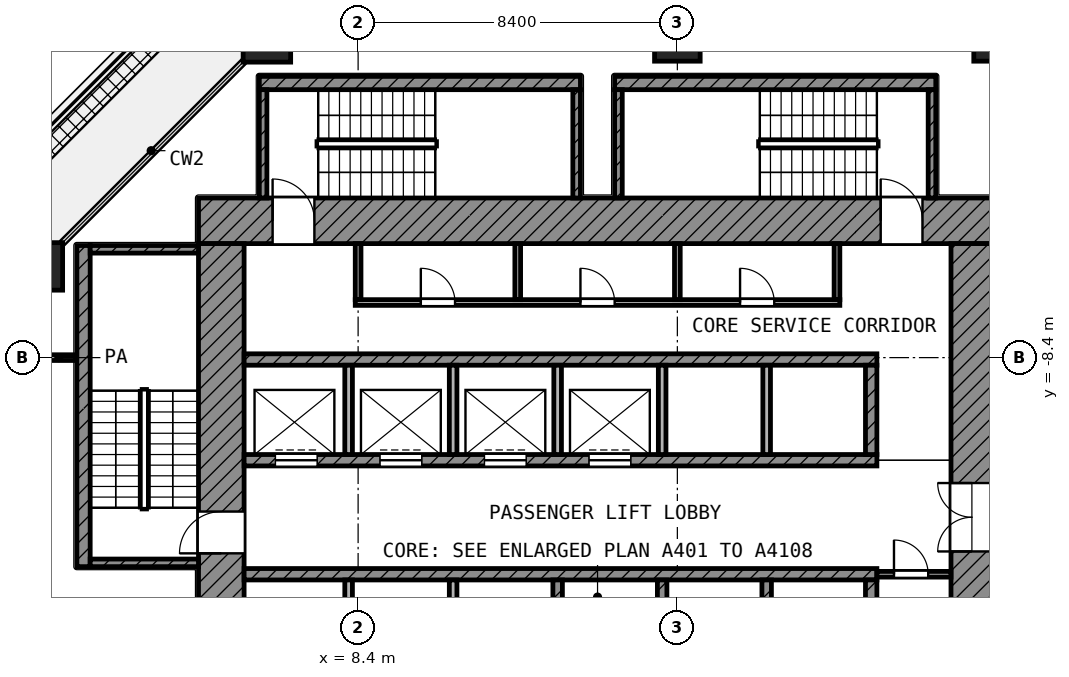
"""IFC4 building model, lengths in metres.
Left out: names, types, materials, properties, quantities, classifications, styles, units other than length and angle.
Written with IfcOpenShell. Run it as: python <this file> out.ifc"""

import sys

from ifc_helpers import new_model, si_unit, direction, frame, frame_2d, origin, origin_2d, place, context, subcontext, project, spatial, rectangle, extrude, element, fill, save


model = new_model("IFC4")
c1 = context("Model", 3, precision=1e-05, world=origin(), true_north=direction((0.0, 1.0)))
c2 = subcontext(c1, "Body", "Model", "MODEL_VIEW")
j1 = project(units=[si_unit("LENGTHUNIT", "METRE"), si_unit("PLANEANGLEUNIT", "RADIAN")], contexts=[c1])
p1 = place(None, origin())
s1 = spatial("IfcSite", under=j1, at=p1, CompositionType="ELEMENT")
p2 = place(p1, origin())
s2 = spatial("IfcBuilding", under=s1, at=p2, CompositionType="ELEMENT")
p3 = place(p2, frame((0.0, 0.0, 60.2)))
s3 = spatial("IfcBuildingStorey", under=s2, at=p3, CompositionType="ELEMENT", Elevation=60.2)
p4 = place(p3, frame((6.0, 0.0, 0.0), z_axis=(0.0, 0.0, 1.0), x_axis=(1.0, 0.0, 0.0)))
e1 = element("IfcColumn", 1, at=p4, inside=s3, PredefinedType="COLUMN", context=c2, shape_type="SweptSolid", body=[
    extrude(rectangle(XDim=1.25, YDim=1.25, at=origin_2d()), origin(), (0.0, 0.0, 1.0), 4.2),
])
for number, where, z_axis, x_axis in (
    (2, (16.8, 0.0, 0.0), (0.0, 0.0, 1.0), (1.0, 0.0, 0.0)),
    (3, (25.2, 0.0, 0.0), (0.0, 0.0, 1.0), (1.0, 0.0, 0.0)),
):
    element("IfcColumn", number, at=place(p3, frame(where, z_axis=z_axis, x_axis=x_axis)), inside=s3, PredefinedType="COLUMN", context=c2, shape_type="SweptSolid", body=[
        extrude(rectangle(XDim=1.2, YDim=1.2, at=origin_2d()), origin(), (0.0, 0.0, 1.0), 4.2),
    ])
p5 = place(p3, frame((0.0, -6.0, 0.0), z_axis=(0.0, 0.0, 1.0), x_axis=(1.0, 0.0, 0.0)))
e4 = element("IfcColumn", 4, at=p5, inside=s3, PredefinedType="COLUMN", context=c2, shape_type="SweptSolid", body=[
    extrude(rectangle(XDim=1.25, YDim=1.25, at=origin_2d()), origin(), (0.0, 0.0, 1.0), 4.2),
])
p6 = place(p3, frame((4.2, -4.8, 0.0), z_axis=(0.0, 0.0, 1.0), x_axis=(1.0, 0.0, 0.0)))
e5 = element("IfcWall", 5, at=p6, inside=s3, PredefinedType="SHEAR", context=c2, shape_type="SweptSolid", body=[
    extrude(rectangle(XDim=20.9, YDim=1.2, at=frame_2d((10.45, 0.0))), origin(), (0.0, 0.0, 1.0), 3.9),
])
p7 = place(p6, frame((1.95, 0.0, 0.0)))
e6 = element("IfcOpeningElement", 6, at=p7, cuts=e5, PredefinedType="OPENING", context=c2, shape_type="SweptSolid", body=[
    extrude(rectangle(XDim=1.1, YDim=2.1, at=frame_2d((0.55, 1.05))), frame((0.0, 0.61, 0.0), z_axis=(0.0, -1.0, 0.0), x_axis=(1.0, 0.0, 0.0)), (0.0, 0.0, 1.0), 1.22),
])
p8 = place(p6, frame((17.95, 0.0, 0.0)))
e7 = element("IfcOpeningElement", 7, at=p8, cuts=e5, PredefinedType="OPENING", context=c2, shape_type="SweptSolid", body=[
    extrude(rectangle(XDim=1.1, YDim=2.1, at=frame_2d((0.55, 1.05))), frame((0.0, 0.61, 0.0), z_axis=(0.0, -1.0, 0.0), x_axis=(1.0, 0.0, 0.0)), (0.0, 0.0, 1.0), 1.22),
])
p9 = place(p3, frame((4.8, -25.1, 0.0), z_axis=(0.0, 0.0, 1.0), x_axis=(0.0, 1.0, 0.0)))
e8 = element("IfcWall", 8, at=p9, inside=s3, PredefinedType="SHEAR", context=c2, shape_type="SweptSolid", body=[
    extrude(rectangle(XDim=19.7, YDim=1.2, at=frame_2d((9.85, 0.0))), origin(), (0.0, 0.0, 1.0), 3.9),
])
p10 = place(p9, frame((11.55, 0.0, 0.0)))
e9 = element("IfcOpeningElement", 9, at=p10, cuts=e8, PredefinedType="OPENING", context=c2, shape_type="SweptSolid", body=[
    extrude(rectangle(XDim=1.1, YDim=2.1, at=frame_2d((0.55, 1.05))), frame((0.0, 0.61, 0.0), z_axis=(0.0, -1.0, 0.0), x_axis=(1.0, 0.0, 0.0)), (0.0, 0.0, 1.0), 1.22),
])
p11 = place(p9, frame((2.25, 0.0, 0.0)))
e10 = element("IfcOpeningElement", 10, at=p11, cuts=e8, PredefinedType="OPENING", context=c2, shape_type="SweptSolid", body=[
    extrude(rectangle(XDim=1.1, YDim=2.1, at=frame_2d((0.55, 1.05))), frame((0.0, 0.61, 0.0), z_axis=(0.0, -1.0, 0.0), x_axis=(1.0, 0.0, 0.0)), (0.0, 0.0, 1.0), 1.22),
])
p12 = place(p3, frame((24.55, -24.0, 0.0), z_axis=(0.0, 0.0, 1.0), x_axis=(0.0, 1.0, 0.0)))
e11 = element("IfcWall", 11, at=p12, inside=s3, PredefinedType="SHEAR", context=c2, shape_type="SweptSolid", body=[
    extrude(rectangle(XDim=18.6, YDim=1.1, at=frame_2d((9.3, 0.0))), origin(), (0.0, 0.0, 1.0), 3.9),
])
p13 = place(p12, frame((10.5, 0.0, 0.0)))
e12 = element("IfcOpeningElement", 12, at=p13, cuts=e11, PredefinedType="OPENING", context=c2, shape_type="SweptSolid", body=[
    extrude(rectangle(XDim=1.8, YDim=2.1, at=frame_2d((0.9, 1.05))), frame((0.0, 0.56, 0.0), z_axis=(0.0, -1.0, 0.0), x_axis=(1.0, 0.0, 0.0)), (0.0, 0.0, 1.0), 1.12),
])
p14 = place(p3, frame((5.4, -8.45, 0.0), z_axis=(0.0, 0.0, 1.0), x_axis=(1.0, 0.0, 0.0)))
e13 = element("IfcWall", 13, at=p14, inside=s3, PredefinedType="SHEAR", context=c2, shape_type="SweptSolid", body=[
    extrude(rectangle(XDim=16.65, YDim=0.3, at=frame_2d((8.325, 0.0))), origin(), (0.0, 0.0, 1.0), 3.9),
])
p15 = place(p3, frame((5.4, -11.1, 0.0), z_axis=(0.0, 0.0, 1.0), x_axis=(1.0, 0.0, 0.0)))
e14 = element("IfcWall", 14, at=p15, inside=s3, PredefinedType="SHEAR", context=c2, shape_type="SweptSolid", body=[
    extrude(rectangle(XDim=16.65, YDim=0.3, at=frame_2d((8.325, 0.0))), origin(), (0.0, 0.0, 1.0), 3.9),
])
p16 = place(p15, frame((0.825, 0.0, 0.0)))
e15 = element("IfcOpeningElement", 15, at=p16, cuts=e14, PredefinedType="OPENING", context=c2, shape_type="SweptSolid", body=[
    extrude(rectangle(XDim=1.1, YDim=2.1, at=frame_2d((0.55, 1.05))), frame((0.0, 0.16, 0.0), z_axis=(0.0, -1.0, 0.0), x_axis=(1.0, 0.0, 0.0)), (0.0, 0.0, 1.0), 0.32),
])
p17 = place(p15, frame((3.575, 0.0, 0.0)))
e16 = element("IfcOpeningElement", 16, at=p17, cuts=e14, PredefinedType="OPENING", context=c2, shape_type="SweptSolid", body=[
    extrude(rectangle(XDim=1.1, YDim=2.1, at=frame_2d((0.55, 1.05))), frame((0.0, 0.16, 0.0), z_axis=(0.0, -1.0, 0.0), x_axis=(1.0, 0.0, 0.0)), (0.0, 0.0, 1.0), 0.32),
])
p18 = place(p15, frame((6.325, 0.0, 0.0)))
e17 = element("IfcOpeningElement", 17, at=p18, cuts=e14, PredefinedType="OPENING", context=c2, shape_type="SweptSolid", body=[
    extrude(rectangle(XDim=1.1, YDim=2.1, at=frame_2d((0.55, 1.05))), frame((0.0, 0.16, 0.0), z_axis=(0.0, -1.0, 0.0), x_axis=(1.0, 0.0, 0.0)), (0.0, 0.0, 1.0), 0.32),
])
p19 = place(p15, frame((9.075, 0.0, 0.0)))
e18 = element("IfcOpeningElement", 18, at=p19, cuts=e14, PredefinedType="OPENING", context=c2, shape_type="SweptSolid", body=[
    extrude(rectangle(XDim=1.1, YDim=2.1, at=frame_2d((0.55, 1.05))), frame((0.0, 0.16, 0.0), z_axis=(0.0, -1.0, 0.0), x_axis=(1.0, 0.0, 0.0)), (0.0, 0.0, 1.0), 0.32),
])
p20 = place(p3, frame((5.4, -14.1, 0.0), z_axis=(0.0, 0.0, 1.0), x_axis=(1.0, 0.0, 0.0)))
e19 = element("IfcWall", 19, at=p20, inside=s3, PredefinedType="SHEAR", context=c2, shape_type="SweptSolid", body=[
    extrude(rectangle(XDim=16.65, YDim=0.3, at=frame_2d((8.325, 0.0))), origin(), (0.0, 0.0, 1.0), 3.9),
])
p21 = place(p3, frame((21.9, -10.95, 0.0), z_axis=(0.0, 0.0, 1.0), x_axis=(0.0, 1.0, 0.0)))
e20 = element("IfcWall", 20, at=p21, inside=s3, PredefinedType="SHEAR", context=c2, shape_type="SweptSolid", body=[
    extrude(rectangle(XDim=2.35, YDim=0.3, at=frame_2d((1.175, 0.0))), origin(), (0.0, 0.0, 1.0), 3.9),
])
p22 = place(p3, frame((21.9, -16.6, 0.0), z_axis=(0.0, 0.0, 1.0), x_axis=(0.0, 1.0, 0.0)))
e21 = element("IfcWall", 21, at=p22, inside=s3, PredefinedType="SHEAR", context=c2, shape_type="SweptSolid", body=[
    extrude(rectangle(XDim=2.35, YDim=0.3, at=frame_2d((1.175, 0.0))), origin(), (0.0, 0.0, 1.0), 3.9),
])
for number, where, z_axis, x_axis in (
    (22, (8.15, -10.95, 0.0), (0.0, 0.0, 1.0), (0.0, 1.0, 0.0)),
    (23, (10.9, -10.95, 0.0), (0.0, 0.0, 1.0), (0.0, 1.0, 0.0)),
    (24, (13.65, -10.95, 0.0), (0.0, 0.0, 1.0), (0.0, 1.0, 0.0)),
    (25, (16.4, -10.95, 0.0), (0.0, 0.0, 1.0), (0.0, 1.0, 0.0)),
    (26, (19.15, -10.95, 0.0), (0.0, 0.0, 1.0), (0.0, 1.0, 0.0)),
):
    element("IfcWall", number, at=place(p3, frame(where, z_axis=z_axis, x_axis=x_axis)), inside=s3, PredefinedType="PARTITIONING", context=c2, shape_type="SweptSolid", body=[
        extrude(rectangle(XDim=2.35, YDim=0.2, at=frame_2d((1.175, 0.0))), origin(), (0.0, 0.0, 1.0), 3.9),
    ])
for number, where, z_axis, x_axis in (
    (27, (8.15, -16.6, 0.0), (0.0, 0.0, 1.0), (0.0, 1.0, 0.0)),
    (28, (10.9, -16.6, 0.0), (0.0, 0.0, 1.0), (0.0, 1.0, 0.0)),
):
    element("IfcWall", number, at=place(p3, frame(where, z_axis=z_axis, x_axis=x_axis)), inside=s3, PredefinedType="PARTITIONING", context=c2, shape_type="SweptSolid", body=[
        extrude(rectangle(XDim=2.35, YDim=0.2, at=frame_2d((1.175, 0.0))), origin(), (0.0, 0.0, 1.0), 3.9),
    ])
for number, where, z_axis, x_axis in (
    (29, (13.65, -16.6, 0.0), (0.0, 0.0, 1.0), (0.0, 1.0, 0.0)),
    (30, (16.4, -16.6, 0.0), (0.0, 0.0, 1.0), (0.0, 1.0, 0.0)),
    (31, (19.15, -16.6, 0.0), (0.0, 0.0, 1.0), (0.0, 1.0, 0.0)),
):
    element("IfcWall", number, at=place(p3, frame(where, z_axis=z_axis, x_axis=x_axis)), inside=s3, PredefinedType="SHEAR", context=c2, shape_type="SweptSolid", body=[
        extrude(rectangle(XDim=2.35, YDim=0.25, at=frame_2d((1.175, 0.0))), origin(), (0.0, 0.0, 1.0), 3.9),
    ])
p23 = place(p3, frame((22.05, -14.1, 0.0), z_axis=(0.0, 0.0, 1.0), x_axis=(1.0, 0.0, 0.0)))
e32 = element("IfcWall", 32, at=p23, inside=s3, PredefinedType="PARTITIONING", context=c2, shape_type="SweptSolid", body=[
    extrude(rectangle(XDim=1.95, YDim=0.15, at=frame_2d((0.975, 0.0))), origin(), (0.0, 0.0, 1.0), 3.9),
])
p24 = place(p23, frame((0.45, 0.0, 0.0)))
e33 = element("IfcOpeningElement", 33, at=p24, cuts=e32, PredefinedType="OPENING", context=c2, shape_type="SweptSolid", body=[
    extrude(rectangle(XDim=0.9, YDim=2.1, at=frame_2d((0.45, 1.05))), frame((0.0, 0.085, 0.0), z_axis=(0.0, -1.0, 0.0), x_axis=(1.0, 0.0, 0.0)), (0.0, 0.0, 1.0), 0.17),
])
p25 = place(p3, frame((8.325, -6.95, 0.0), z_axis=(0.0, 0.0, 1.0), x_axis=(1.0, 0.0, 0.0)))
e34 = element("IfcWall", 34, at=p25, inside=s3, PredefinedType="PARTITIONING", context=c2, shape_type="SweptSolid", body=[
    extrude(rectangle(XDim=12.75, YDim=0.15, at=frame_2d((6.375, 0.0))), origin(), (0.0, 0.0, 1.0), 3.9),
])
p26 = place(p25, frame((1.725, 0.0, 0.0)))
e35 = element("IfcOpeningElement", 35, at=p26, cuts=e34, PredefinedType="OPENING", context=c2, shape_type="SweptSolid", body=[
    extrude(rectangle(XDim=0.9, YDim=2.1, at=frame_2d((0.45, 1.05))), frame((0.0, 0.085, 0.0), z_axis=(0.0, -1.0, 0.0), x_axis=(1.0, 0.0, 0.0)), (0.0, 0.0, 1.0), 0.17),
])
p27 = place(p25, frame((5.925, 0.0, 0.0)))
e36 = element("IfcOpeningElement", 36, at=p27, cuts=e34, PredefinedType="OPENING", context=c2, shape_type="SweptSolid", body=[
    extrude(rectangle(XDim=0.9, YDim=2.1, at=frame_2d((0.45, 1.05))), frame((0.0, 0.085, 0.0), z_axis=(0.0, -1.0, 0.0), x_axis=(1.0, 0.0, 0.0)), (0.0, 0.0, 1.0), 0.17),
])
p28 = place(p25, frame((10.125, 0.0, 0.0)))
e37 = element("IfcOpeningElement", 37, at=p28, cuts=e34, PredefinedType="OPENING", context=c2, shape_type="SweptSolid", body=[
    extrude(rectangle(XDim=0.9, YDim=2.1, at=frame_2d((0.45, 1.05))), frame((0.0, 0.085, 0.0), z_axis=(0.0, -1.0, 0.0), x_axis=(1.0, 0.0, 0.0)), (0.0, 0.0, 1.0), 0.17),
])
for number, where, z_axis, x_axis in (
    (38, (8.4, -6.875, 0.0), (0.0, 0.0, 1.0), (0.0, 1.0, 0.0)),
    (39, (12.6, -6.875, 0.0), (0.0, 0.0, 1.0), (0.0, 1.0, 0.0)),
    (40, (16.8, -6.875, 0.0), (0.0, 0.0, 1.0), (0.0, 1.0, 0.0)),
    (41, (21.0, -6.875, 0.0), (0.0, 0.0, 1.0), (0.0, 1.0, 0.0)),
):
    element("IfcWall", number, at=place(p3, frame(where, z_axis=z_axis, x_axis=x_axis)), inside=s3, PredefinedType="PARTITIONING", context=c2, shape_type="SweptSolid", body=[
        extrude(rectangle(XDim=1.475, YDim=0.15, at=frame_2d((0.738, 0.0))), origin(), (0.0, 0.0, 1.0), 3.9),
    ])
p29 = place(p3, frame((1.175, -13.9, 0.0), z_axis=(0.0, 0.0, 1.0), x_axis=(0.0, 1.0, 0.0)))
e42 = element("IfcWall", 42, at=p29, inside=s3, PredefinedType="SHEAR", context=c2, shape_type="SweptSolid", body=[
    extrude(rectangle(XDim=8.45, YDim=0.35, at=frame_2d((4.225, 0.0))), origin(), (0.0, 0.0, 1.0), 3.9),
])
for number, where, z_axis, x_axis in (
    (43, (1.35, -5.55, 0.0), (0.0, 0.0, 1.0), (1.0, 0.0, 0.0)),
    (44, (1.35, -13.8, 0.0), (0.0, 0.0, 1.0), (1.0, 0.0, 0.0)),
):
    element("IfcWall", number, at=place(p3, frame(where, z_axis=z_axis, x_axis=x_axis)), inside=s3, PredefinedType="SHEAR", context=c2, shape_type="SweptSolid", body=[
        extrude(rectangle(XDim=2.85, YDim=0.2, at=frame_2d((1.425, 0.0))), origin(), (0.0, 0.0, 1.0), 3.9),
    ])
p30 = place(p3, frame((5.8, -1.175, 0.0), z_axis=(0.0, 0.0, 1.0), x_axis=(1.0, 0.0, 0.0)))
e45 = element("IfcWall", 45, at=p30, inside=s3, PredefinedType="SHEAR", context=c2, shape_type="SweptSolid", body=[
    extrude(rectangle(XDim=8.45, YDim=0.35, at=frame_2d((4.225, 0.0))), origin(), (0.0, 0.0, 1.0), 3.9),
])
for number, where, z_axis, x_axis in (
    (46, (5.9, -4.2, 0.0), (0.0, 0.0, 1.0), (0.0, 1.0, 0.0)),
    (47, (14.15, -4.2, 0.0), (0.0, 0.0, 1.0), (0.0, 1.0, 0.0)),
):
    element("IfcWall", number, at=place(p3, frame(where, z_axis=z_axis, x_axis=x_axis)), inside=s3, PredefinedType="SHEAR", context=c2, shape_type="SweptSolid", body=[
        extrude(rectangle(XDim=2.85, YDim=0.2, at=frame_2d((1.425, 0.0))), origin(), (0.0, 0.0, 1.0), 3.9),
    ])
p31 = place(p3, frame((15.15, -1.175, 0.0), z_axis=(0.0, 0.0, 1.0), x_axis=(1.0, 0.0, 0.0)))
e48 = element("IfcWall", 48, at=p31, inside=s3, PredefinedType="SHEAR", context=c2, shape_type="SweptSolid", body=[
    extrude(rectangle(XDim=8.45, YDim=0.35, at=frame_2d((4.225, 0.0))), origin(), (0.0, 0.0, 1.0), 3.9),
])
for number, where, z_axis, x_axis in (
    (49, (15.25, -4.2, 0.0), (0.0, 0.0, 1.0), (0.0, 1.0, 0.0)),
    (50, (23.5, -4.2, 0.0), (0.0, 0.0, 1.0), (0.0, 1.0, 0.0)),
):
    element("IfcWall", number, at=place(p3, frame(where, z_axis=z_axis, x_axis=x_axis)), inside=s3, PredefinedType="SHEAR", context=c2, shape_type="SweptSolid", body=[
        extrude(rectangle(XDim=2.85, YDim=0.2, at=frame_2d((1.425, 0.0))), origin(), (0.0, 0.0, 1.0), 3.9),
    ])
p32 = place(p3, frame((0.08, -8.4, 0.0), z_axis=(0.0, 0.0, 1.0), x_axis=(1.0, 0.0, 0.0)))
e51 = element("IfcWall", 51, at=p32, inside=s3, PredefinedType="PARTITIONING", context=c2, shape_type="SweptSolid", body=[
    extrude(rectangle(XDim=0.89, YDim=0.15, at=frame_2d((0.445, 0.0))), origin(), (0.0, 0.0, 1.0), 3.9),
])
p33 = place(p16, origin())
e52 = element("IfcDoor", 52, at=p33, inside=s3, OperationType="DOUBLE_DOOR_SLIDING", PredefinedType="DOOR", context=c2, shape_type="SweptSolid", body=[
    extrude(rectangle(XDim=1.1, YDim=2.1, at=frame_2d((0.55, 1.05))), frame((0.0, 0.025, 0.0), z_axis=(0.0, -1.0, 0.0), x_axis=(1.0, 0.0, 0.0)), (0.0, 0.0, 1.0), 0.05),
])
fill(e15, e52)
p34 = place(p17, origin())
e53 = element("IfcDoor", 53, at=p34, inside=s3, OperationType="DOUBLE_DOOR_SLIDING", PredefinedType="DOOR", context=c2, shape_type="SweptSolid", body=[
    extrude(rectangle(XDim=1.1, YDim=2.1, at=frame_2d((0.55, 1.05))), frame((0.0, 0.025, 0.0), z_axis=(0.0, -1.0, 0.0), x_axis=(1.0, 0.0, 0.0)), (0.0, 0.0, 1.0), 0.05),
])
fill(e16, e53)
p35 = place(p18, origin())
e54 = element("IfcDoor", 54, at=p35, inside=s3, OperationType="DOUBLE_DOOR_SLIDING", PredefinedType="DOOR", context=c2, shape_type="SweptSolid", body=[
    extrude(rectangle(XDim=1.1, YDim=2.1, at=frame_2d((0.55, 1.05))), frame((0.0, 0.025, 0.0), z_axis=(0.0, -1.0, 0.0), x_axis=(1.0, 0.0, 0.0)), (0.0, 0.0, 1.0), 0.05),
])
fill(e17, e54)
p36 = place(p19, origin())
e55 = element("IfcDoor", 55, at=p36, inside=s3, OperationType="DOUBLE_DOOR_SLIDING", PredefinedType="DOOR", context=c2, shape_type="SweptSolid", body=[
    extrude(rectangle(XDim=1.1, YDim=2.1, at=frame_2d((0.55, 1.05))), frame((0.0, 0.025, 0.0), z_axis=(0.0, -1.0, 0.0), x_axis=(1.0, 0.0, 0.0)), (0.0, 0.0, 1.0), 0.05),
])
fill(e18, e55)
p37 = place(p10, origin())
e56 = element("IfcDoor", 56, at=p37, inside=s3, OperationType="SINGLE_SWING_LEFT", PredefinedType="DOOR", context=c2, shape_type="SweptSolid", body=[
    extrude(rectangle(XDim=1.1, YDim=2.1, at=frame_2d((0.55, 1.05))), frame((0.0, 0.025, 0.0), z_axis=(0.0, -1.0, 0.0), x_axis=(1.0, 0.0, 0.0)), (0.0, 0.0, 1.0), 0.05),
])
fill(e9, e56)
p38 = place(p7, origin())
e57 = element("IfcDoor", 57, at=p38, inside=s3, OperationType="SINGLE_SWING_LEFT", PredefinedType="DOOR", context=c2, shape_type="SweptSolid", body=[
    extrude(rectangle(XDim=1.1, YDim=2.1, at=frame_2d((0.55, 1.05))), frame((0.0, 0.025, 0.0), z_axis=(0.0, -1.0, 0.0), x_axis=(1.0, 0.0, 0.0)), (0.0, 0.0, 1.0), 0.05),
])
fill(e6, e57)
p39 = place(p8, origin())
e58 = element("IfcDoor", 58, at=p39, inside=s3, OperationType="SINGLE_SWING_LEFT", PredefinedType="DOOR", context=c2, shape_type="SweptSolid", body=[
    extrude(rectangle(XDim=1.1, YDim=2.1, at=frame_2d((0.55, 1.05))), frame((0.0, 0.025, 0.0), z_axis=(0.0, -1.0, 0.0), x_axis=(1.0, 0.0, 0.0)), (0.0, 0.0, 1.0), 0.05),
])
fill(e7, e58)
p40 = place(p13, origin())
e59 = element("IfcDoor", 59, at=p40, inside=s3, OperationType="DOUBLE_DOOR_SINGLE_SWING", PredefinedType="DOOR", context=c2, shape_type="SweptSolid", body=[
    extrude(rectangle(XDim=1.8, YDim=2.1, at=frame_2d((0.9, 1.05))), frame((0.0, 0.025, 0.0), z_axis=(0.0, -1.0, 0.0), x_axis=(1.0, 0.0, 0.0)), (0.0, 0.0, 1.0), 0.05),
])
fill(e12, e59)
p41 = place(p26, origin())
e60 = element("IfcDoor", 60, at=p41, inside=s3, OperationType="SINGLE_SWING_LEFT", PredefinedType="DOOR", context=c2, shape_type="SweptSolid", body=[
    extrude(rectangle(XDim=0.9, YDim=2.1, at=frame_2d((0.45, 1.05))), frame((0.0, 0.025, 0.0), z_axis=(0.0, -1.0, 0.0), x_axis=(1.0, 0.0, 0.0)), (0.0, 0.0, 1.0), 0.05),
])
fill(e35, e60)
p42 = place(p27, origin())
e61 = element("IfcDoor", 61, at=p42, inside=s3, OperationType="SINGLE_SWING_LEFT", PredefinedType="DOOR", context=c2, shape_type="SweptSolid", body=[
    extrude(rectangle(XDim=0.9, YDim=2.1, at=frame_2d((0.45, 1.05))), frame((0.0, 0.025, 0.0), z_axis=(0.0, -1.0, 0.0), x_axis=(1.0, 0.0, 0.0)), (0.0, 0.0, 1.0), 0.05),
])
fill(e36, e61)
p43 = place(p28, origin())
e62 = element("IfcDoor", 62, at=p43, inside=s3, OperationType="SINGLE_SWING_LEFT", PredefinedType="DOOR", context=c2, shape_type="SweptSolid", body=[
    extrude(rectangle(XDim=0.9, YDim=2.1, at=frame_2d((0.45, 1.05))), frame((0.0, 0.025, 0.0), z_axis=(0.0, -1.0, 0.0), x_axis=(1.0, 0.0, 0.0)), (0.0, 0.0, 1.0), 0.05),
])
fill(e37, e62)
p44 = place(p24, origin())
e63 = element("IfcDoor", 63, at=p44, inside=s3, OperationType="SINGLE_SWING_LEFT", PredefinedType="DOOR", context=c2, shape_type="SweptSolid", body=[
    extrude(rectangle(XDim=0.9, YDim=2.1, at=frame_2d((0.45, 1.05))), frame((0.0, 0.025, 0.0), z_axis=(0.0, -1.0, 0.0), x_axis=(1.0, 0.0, 0.0)), (0.0, 0.0, 1.0), 0.05),
])
fill(e33, e63)
save(model, sys.argv[1])
